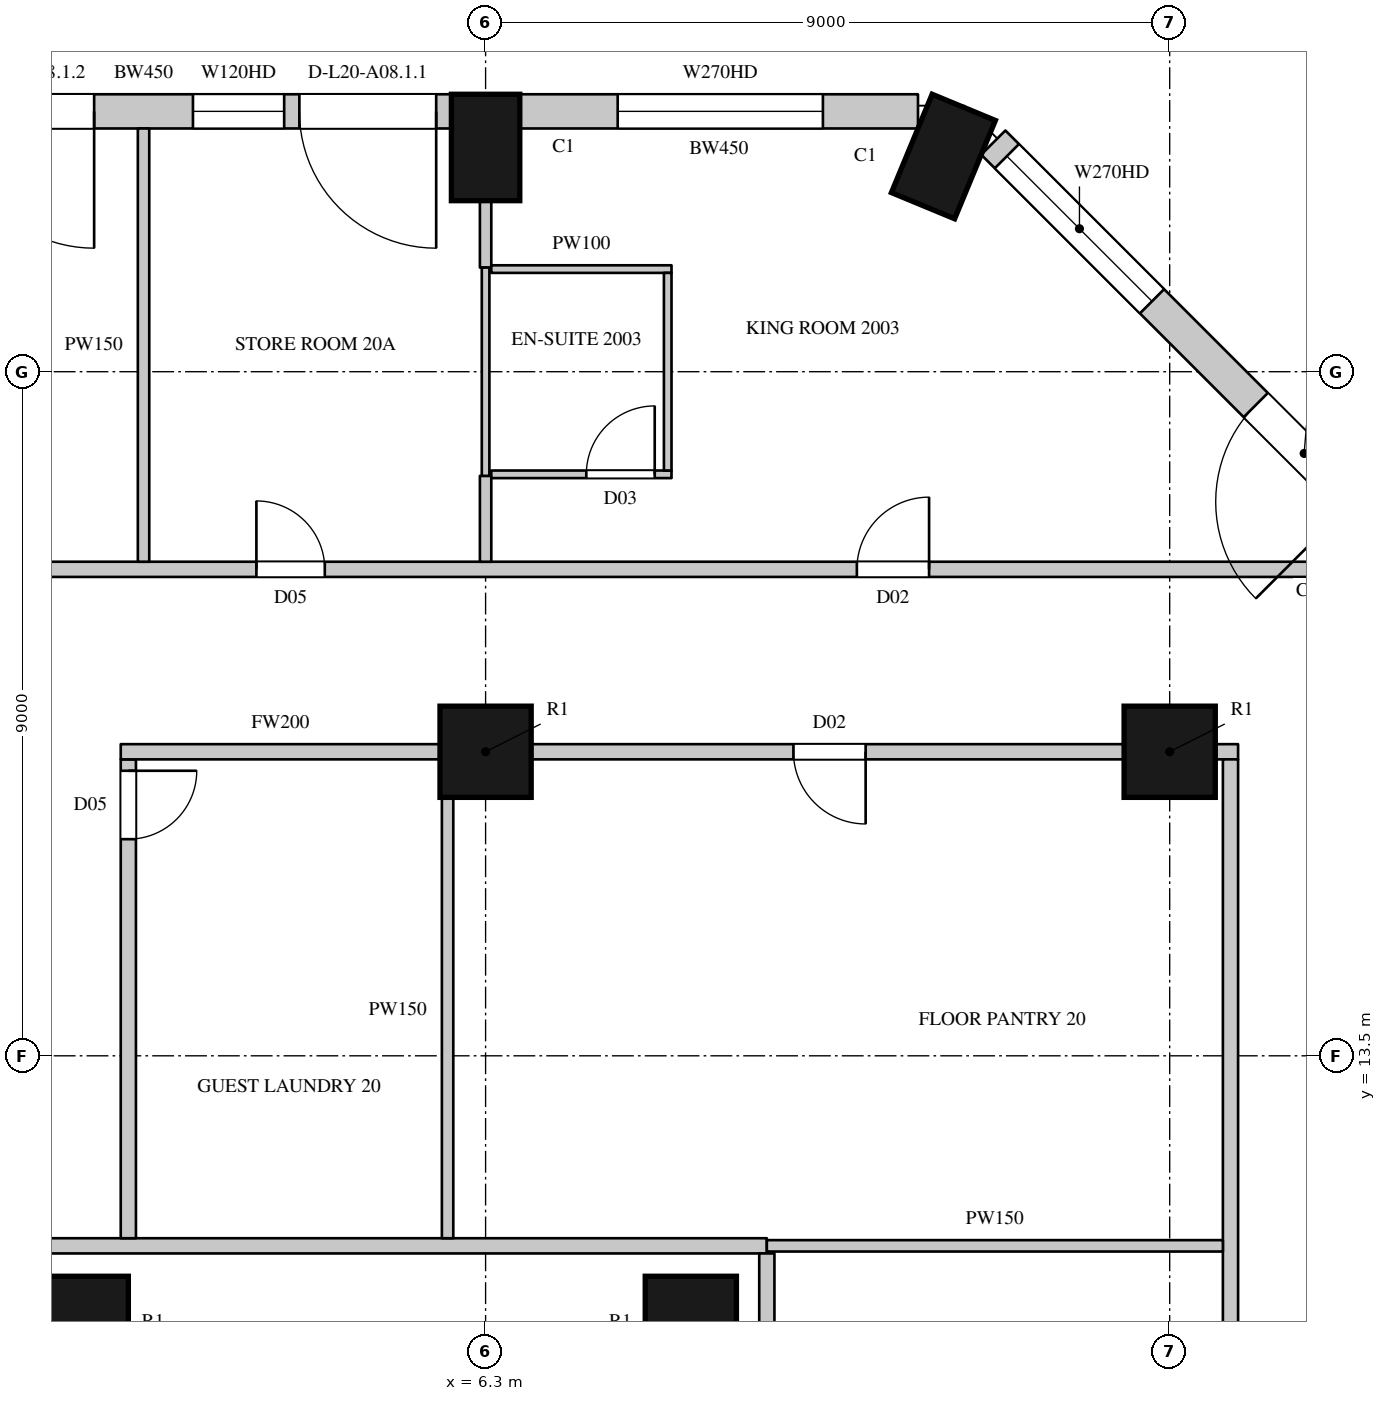
"""IFC4 building model, lengths in metres.
Left out: names, types, materials, properties, quantities, classifications, styles, units other than length and angle.
Written with IfcOpenShell. Run it as: python <this file> out.ifc"""

import sys

from ifc_helpers import new_model, si_unit, direction, frame, frame_2d, origin, origin_2d, place, context, subcontext, project, spatial, rectangle, circle, extrude, element, fill, save


model = new_model("IFC4")
c1 = context("Model", 3, precision=1e-05, world=origin(), true_north=direction((0.0, 1.0)))
c2 = subcontext(c1, "Body", "Model", "MODEL_VIEW")
j1 = project(units=[si_unit("LENGTHUNIT", "METRE"), si_unit("PLANEANGLEUNIT", "RADIAN")], contexts=[c1])
p1 = place(None, origin())
s1 = spatial("IfcSite", under=j1, at=p1, CompositionType="ELEMENT")
p2 = place(p1, origin())
s2 = spatial("IfcBuilding", under=s1, at=p2, CompositionType="ELEMENT")
p3 = place(p2, frame((0.0, 0.0, 102.3)))
s3 = spatial("IfcBuildingStorey", under=s2, at=p3, CompositionType="ELEMENT", Elevation=102.3)
for number, where, z_axis, x_axis in (
    (1, (12.323, 25.331, 0.0), (0.0, 0.0, 1.0), (-0.924, 0.383, 0.0)),
    (2, (6.3, 25.45, 0.0), (0.0, 0.0, 1.0), (-1.0, 0.0, 0.0)),
):
    element("IfcColumn", number, at=place(p3, frame(where, z_axis=z_axis, x_axis=x_axis)), inside=s3, PredefinedType="COLUMN", context=c2, shape_type="SweptSolid", body=[
        extrude(rectangle(XDim=0.9, YDim=1.4, at=origin_2d()), origin(), (0.0, 0.0, 1.0), 3.6),
    ])
for number, where, z_axis, x_axis in (
    (3, (6.3, 17.5, 0.0), (0.0, 0.0, 1.0), (1.0, 0.0, 0.0)),
    (4, (15.3, 17.5, 0.0), (0.0, 0.0, 1.0), (1.0, 0.0, 0.0)),
    (5, (1.0, 10.0, 0.0), (0.0, 0.0, 1.0), (1.0, 0.0, 0.0)),
    (6, (9.0, 10.0, 0.0), (0.0, 0.0, 1.0), (1.0, 0.0, 0.0)),
):
    element("IfcColumn", number, at=place(p3, frame(where, z_axis=z_axis, x_axis=x_axis)), inside=s3, PredefinedType="COLUMN", context=c2, shape_type="SweptSolid", body=[
        extrude(circle(Radius=0.6, at=origin_2d()), origin(), (0.0, 0.0, 1.0), 3.6),
    ])
p4 = place(p3, frame((18.229, 20.265, 0.0), z_axis=(0.0, 0.0, 1.0), x_axis=(-0.707106781187, 0.707106781187, 0.0)))
e7 = element("IfcWall", 7, at=p4, inside=s3, PredefinedType="SOLIDWALL", context=c2, shape_type="SweptSolid", body=[
    extrude(rectangle(XDim=7.424, YDim=0.45, at=frame_2d((3.712, 0.0))), origin(), (0.0, 0.0, 1.0), 3.3),
])
p5 = place(p4, frame((0.74, 0.0, 0.0)))
e8 = element("IfcOpeningElement", 8, at=p5, cuts=e7, PredefinedType="OPENING", context=c2, shape_type="SweptSolid", body=[
    extrude(rectangle(XDim=1.8, YDim=2.4, at=frame_2d((0.9, 1.2))), frame((0.0, 0.235, 0.0), z_axis=(0.0, -1.0, 0.0), x_axis=(1.0, 0.0, 0.0)), (0.0, 0.0, 1.0), 0.47),
])
p6 = place(p4, frame((4.471, 0.0, 1.05)))
e9 = element("IfcOpeningElement", 9, at=p6, cuts=e7, PredefinedType="OPENING", context=c2, shape_type="SweptSolid", body=[
    extrude(rectangle(XDim=2.7, YDim=2.0, at=frame_2d((1.35, 1.0))), frame((0.0, 0.235, 0.0), z_axis=(0.0, -1.0, 0.0), x_axis=(1.0, 0.0, 0.0)), (0.0, 0.0, 1.0), 0.47),
])
p7 = place(p3, frame((11.989, 25.925, 0.0), z_axis=(0.0, 0.0, 1.0), x_axis=(-1.0, 0.0, 0.0)))
e10 = element("IfcWall", 10, at=p7, inside=s3, PredefinedType="SOLIDWALL", context=c2, shape_type="SweptSolid", body=[
    extrude(rectangle(XDim=5.239, YDim=0.45, at=frame_2d((2.619, 0.0))), origin(), (0.0, 0.0, 1.0), 3.3),
])
p8 = place(p7, frame((1.251, 0.0, 1.05)))
e11 = element("IfcOpeningElement", 11, at=p8, cuts=e10, PredefinedType="OPENING", context=c2, shape_type="SweptSolid", body=[
    extrude(rectangle(XDim=2.7, YDim=2.0, at=frame_2d((1.35, 1.0))), frame((0.0, 0.235, 0.0), z_axis=(0.0, -1.0, 0.0), x_axis=(1.0, 0.0, 0.0)), (0.0, 0.0, 1.0), 0.47),
])
p9 = place(p3, frame((5.85, 25.925, 0.0), z_axis=(0.0, 0.0, 1.0), x_axis=(-1.0, 0.0, 0.0)))
e12 = element("IfcWall", 12, at=p9, inside=s3, PredefinedType="SOLIDWALL", context=c2, shape_type="SweptSolid", body=[
    extrude(rectangle(XDim=8.1, YDim=0.45, at=frame_2d((4.05, 0.0))), origin(), (0.0, 0.0, 1.0), 3.3),
])
p10 = place(p9, frame((0.2, 0.0, 0.0)))
e13 = element("IfcOpeningElement", 13, at=p10, cuts=e12, PredefinedType="OPENING", context=c2, shape_type="SweptSolid", body=[
    extrude(rectangle(XDim=1.8, YDim=2.4, at=frame_2d((0.9, 1.2))), frame((0.0, 0.235, 0.0), z_axis=(0.0, -1.0, 0.0), x_axis=(1.0, 0.0, 0.0)), (0.0, 0.0, 1.0), 0.47),
])
p11 = place(p9, frame((2.2, 0.0, 1.05)))
e14 = element("IfcOpeningElement", 14, at=p11, cuts=e12, PredefinedType="OPENING", context=c2, shape_type="SweptSolid", body=[
    extrude(rectangle(XDim=1.2, YDim=2.0, at=frame_2d((0.6, 1.0))), frame((0.0, 0.235, 0.0), z_axis=(0.0, -1.0, 0.0), x_axis=(1.0, 0.0, 0.0)), (0.0, 0.0, 1.0), 0.47),
])
p12 = place(p9, frame((4.7, 0.0, 0.0)))
e15 = element("IfcOpeningElement", 15, at=p12, cuts=e12, PredefinedType="OPENING", context=c2, shape_type="SweptSolid", body=[
    extrude(rectangle(XDim=1.8, YDim=2.4, at=frame_2d((0.9, 1.2))), frame((0.0, 0.235, 0.0), z_axis=(0.0, -1.0, 0.0), x_axis=(1.0, 0.0, 0.0)), (0.0, 0.0, 1.0), 0.47),
])
p13 = place(p9, frame((6.7, 0.0, 1.05)))
e16 = element("IfcOpeningElement", 16, at=p13, cuts=e12, PredefinedType="OPENING", context=c2, shape_type="SweptSolid", body=[
    extrude(rectangle(XDim=1.2, YDim=2.0, at=frame_2d((0.6, 1.0))), frame((0.0, 0.235, 0.0), z_axis=(0.0, -1.0, 0.0), x_axis=(1.0, 0.0, 0.0)), (0.0, 0.0, 1.0), 0.47),
])
p14 = place(p3, frame((16.486, 23.529, 0.0), z_axis=(0.0, 0.0, 1.0), x_axis=(-0.707022305137, 0.707191247145, 0.0)))
e17 = element("IfcWall", 17, at=p14, inside=s3, PredefinedType="SOLIDWALL", context=c2, shape_type="SweptSolid", body=[
    extrude(rectangle(XDim=1.445, YDim=0.45, at=frame_2d((0.723, 0.0))), origin(), (0.0, 0.0, 1.0), 0.6),
])
p15 = place(p3, frame((-23.765, 19.9, 0.0), z_axis=(0.0, 0.0, 1.0), x_axis=(1.0, 0.0, 0.0)))
e18 = element("IfcWall", 18, at=p15, inside=s3, PredefinedType="PARTITIONING", context=c2, shape_type="SweptSolid", body=[
    extrude(rectangle(XDim=41.549, YDim=0.2, at=frame_2d((20.774, 0.0))), origin(), (0.0, 0.0, 1.0), 3.3),
])
p16 = place(p15, frame((14.2, 0.0, 0.0)))
e19 = element("IfcOpeningElement", 19, at=p16, cuts=e18, PredefinedType="OPENING", context=c2, shape_type="SweptSolid", body=[
    extrude(rectangle(XDim=0.9, YDim=2.2, at=frame_2d((0.45, 1.1))), frame((0.0, 0.11, 0.0), z_axis=(0.0, -1.0, 0.0), x_axis=(1.0, 0.0, 0.0)), (0.0, 0.0, 1.0), 0.22),
])
p17 = place(p15, frame((27.05, 0.0, 0.0)))
e20 = element("IfcOpeningElement", 20, at=p17, cuts=e18, PredefinedType="OPENING", context=c2, shape_type="SweptSolid", body=[
    extrude(rectangle(XDim=0.9, YDim=2.2, at=frame_2d((0.45, 1.1))), frame((0.0, 0.11, 0.0), z_axis=(0.0, -1.0, 0.0), x_axis=(1.0, 0.0, 0.0)), (0.0, 0.0, 1.0), 0.22),
])
p18 = place(p15, frame((0.75, 0.0, 0.0)))
e21 = element("IfcOpeningElement", 21, at=p18, cuts=e18, PredefinedType="OPENING", context=c2, shape_type="SweptSolid", body=[
    extrude(rectangle(XDim=1.1, YDim=2.4, at=frame_2d((0.55, 1.2))), frame((0.0, 0.11, 0.0), z_axis=(0.0, -1.0, 0.0), x_axis=(1.0, 0.0, 0.0)), (0.0, 0.0, 1.0), 0.22),
])
p19 = place(p15, frame((23.15, 0.0, 0.0)))
e22 = element("IfcOpeningElement", 22, at=p19, cuts=e18, PredefinedType="OPENING", context=c2, shape_type="SweptSolid", body=[
    extrude(rectangle(XDim=0.95, YDim=2.2, at=frame_2d((0.475, 1.1))), frame((0.0, 0.11, 0.0), z_axis=(0.0, -1.0, 0.0), x_axis=(1.0, 0.0, 0.0)), (0.0, 0.0, 1.0), 0.22),
])
p20 = place(p15, frame((34.95, 0.0, 0.0)))
e23 = element("IfcOpeningElement", 23, at=p20, cuts=e18, PredefinedType="OPENING", context=c2, shape_type="SweptSolid", body=[
    extrude(rectangle(XDim=0.95, YDim=2.2, at=frame_2d((0.475, 1.1))), frame((0.0, 0.11, 0.0), z_axis=(0.0, -1.0, 0.0), x_axis=(1.0, 0.0, 0.0)), (0.0, 0.0, 1.0), 0.22),
])
p21 = place(p3, frame((-7.9, 11.0, 0.0), z_axis=(0.0, 0.0, 1.0), x_axis=(1.0, 0.0, 0.0)))
e24 = element("IfcWall", 24, at=p21, inside=s3, PredefinedType="PARTITIONING", context=c2, shape_type="SweptSolid", body=[
    extrude(rectangle(XDim=17.9, YDim=0.2, at=frame_2d((8.95, 0.0))), origin(), (0.0, 0.0, 1.0), 3.3),
])
p22 = place(p21, frame((6.5, 0.0, 0.0)))
e25 = element("IfcOpeningElement", 25, at=p22, cuts=e24, PredefinedType="OPENING", context=c2, shape_type="SweptSolid", body=[
    extrude(rectangle(XDim=1.5, YDim=2.2, at=frame_2d((0.75, 1.1))), frame((0.0, 0.11, 0.0), z_axis=(0.0, -1.0, 0.0), x_axis=(1.0, 0.0, 0.0)), (0.0, 0.0, 1.0), 0.22),
])
p23 = place(p3, frame((1.6, 11.1, 0.0), z_axis=(0.0, 0.0, 1.0), x_axis=(0.0, 1.0, 0.0)))
e26 = element("IfcWall", 26, at=p23, inside=s3, PredefinedType="PARTITIONING", context=c2, shape_type="SweptSolid", body=[
    extrude(rectangle(XDim=6.3, YDim=0.2, at=frame_2d((3.15, 0.0))), origin(), (0.0, 0.0, 1.0), 3.3),
])
p24 = place(p23, frame((5.25, 0.0, 0.0)))
e27 = element("IfcOpeningElement", 27, at=p24, cuts=e26, PredefinedType="OPENING", context=c2, shape_type="SweptSolid", body=[
    extrude(rectangle(XDim=0.9, YDim=2.2, at=frame_2d((0.45, 1.1))), frame((0.0, 0.11, 0.0), z_axis=(0.0, -1.0, 0.0), x_axis=(1.0, 0.0, 0.0)), (0.0, 0.0, 1.0), 0.22),
])
p25 = place(p3, frame((1.5, 17.5, 0.0), z_axis=(0.0, 0.0, 1.0), x_axis=(1.0, 0.0, 0.0)))
e28 = element("IfcWall", 28, at=p25, inside=s3, PredefinedType="PARTITIONING", context=c2, shape_type="SweptSolid", body=[
    extrude(rectangle(XDim=4.2, YDim=0.2, at=frame_2d((2.1, 0.0))), origin(), (0.0, 0.0, 1.0), 2.75),
])
p26 = place(p3, frame((6.9, 17.5, 0.0), z_axis=(0.0, 0.0, 1.0), x_axis=(1.0, 0.0, 0.0)))
e29 = element("IfcWall", 29, at=p26, inside=s3, PredefinedType="PARTITIONING", context=c2, shape_type="SweptSolid", body=[
    extrude(rectangle(XDim=7.8, YDim=0.2, at=frame_2d((3.9, 0.0))), origin(), (0.0, 0.0, 1.0), 2.75),
])
p27 = place(p26, frame((3.45, 0.0, 0.0)))
e30 = element("IfcOpeningElement", 30, at=p27, cuts=e29, PredefinedType="OPENING", context=c2, shape_type="SweptSolid", body=[
    extrude(rectangle(XDim=0.95, YDim=2.2, at=frame_2d((0.475, 1.1))), frame((0.0, 0.11, 0.0), z_axis=(0.0, -1.0, 0.0), x_axis=(1.0, 0.0, 0.0)), (0.0, 0.0, 1.0), 0.22),
])
p28 = place(p3, frame((15.9, 17.5, 0.0), z_axis=(0.0, 0.0, 1.0), x_axis=(1.0, 0.0, 0.0)))
e31 = element("IfcWall", 31, at=p28, inside=s3, PredefinedType="PARTITIONING", context=c2, shape_type="SweptSolid", body=[
    extrude(rectangle(XDim=0.3, YDim=0.2, at=frame_2d((0.15, 0.0))), origin(), (0.0, 0.0, 1.0), 3.3),
])
p29 = place(p3, frame((10.0, -10.9, 0.0), z_axis=(0.0, 0.0, 1.0), x_axis=(0.0, 1.0, 0.0)))
e32 = element("IfcWall", 32, at=p29, inside=s3, PredefinedType="PARTITIONING", context=c2, shape_type="SweptSolid", body=[
    extrude(rectangle(XDim=21.8, YDim=0.2, at=frame_2d((10.9, 0.0))), origin(), (0.0, 0.0, 1.0), 3.3),
])
p30 = place(p29, frame((15.9, 0.0, 0.0)))
e33 = element("IfcOpeningElement", 33, at=p30, cuts=e32, PredefinedType="OPENING", context=c2, shape_type="SweptSolid", body=[
    extrude(rectangle(XDim=1.5, YDim=2.2, at=frame_2d((0.75, 1.1))), frame((0.0, 0.11, 0.0), z_axis=(0.0, -1.0, 0.0), x_axis=(1.0, 0.0, 0.0)), (0.0, 0.0, 1.0), 0.22),
])
p31 = place(p29, frame((11.55, 0.0, 0.0)))
e34 = element("IfcOpeningElement", 34, at=p31, cuts=e32, PredefinedType="OPENING", context=c2, shape_type="SweptSolid", body=[
    extrude(rectangle(XDim=1.5, YDim=2.2, at=frame_2d((0.75, 1.1))), frame((0.0, 0.11, 0.0), z_axis=(0.0, -1.0, 0.0), x_axis=(1.0, 0.0, 0.0)), (0.0, 0.0, 1.0), 0.22),
])
p32 = place(p3, frame((16.1, 6.825, 0.0), z_axis=(0.0, 0.0, 1.0), x_axis=(0.0, 1.0, 0.0)))
e35 = element("IfcWall", 35, at=p32, inside=s3, PredefinedType="PARTITIONING", context=c2, shape_type="SweptSolid", body=[
    extrude(rectangle(XDim=10.575, YDim=0.2, at=frame_2d((5.288, 0.0))), origin(), (0.0, 0.0, 1.0), 3.3),
])
p33 = place(p3, frame((1.8, 20.0, 0.0), z_axis=(0.0, 0.0, 1.0), x_axis=(0.0, 1.0, 0.0)))
e36 = element("IfcWall", 36, at=p33, inside=s3, PredefinedType="PARTITIONING", context=c2, shape_type="SweptSolid", body=[
    extrude(rectangle(XDim=5.7, YDim=0.15, at=frame_2d((2.85, 0.0))), origin(), (0.0, 0.0, 1.0), 2.65),
])
p34 = place(p3, frame((5.8, 11.1, 0.0), z_axis=(0.0, 0.0, 1.0), x_axis=(0.0, 1.0, 0.0)))
e37 = element("IfcWall", 37, at=p34, inside=s3, PredefinedType="PARTITIONING", context=c2, shape_type="SweptSolid", body=[
    extrude(rectangle(XDim=5.989, YDim=0.15, at=frame_2d((2.994, 0.0))), origin(), (0.0, 0.0, 1.0), 3.3),
])
p35 = place(p3, frame((6.3, 20.0, 0.0), z_axis=(0.0, 0.0, 1.0), x_axis=(0.0, 1.0, 0.0)))
e38 = element("IfcWall", 38, at=p35, inside=s3, PredefinedType="PARTITIONING", context=c2, shape_type="SweptSolid", body=[
    extrude(rectangle(XDim=1.13, YDim=0.15, at=frame_2d((0.565, 0.0))), origin(), (0.0, 0.0, 1.0), 2.75),
])
p36 = place(p3, frame((6.3, 23.87, 0.0), z_axis=(0.0, 0.0, 1.0), x_axis=(0.0, 1.0, 0.0)))
e39 = element("IfcWall", 39, at=p36, inside=s3, PredefinedType="PARTITIONING", context=c2, shape_type="SweptSolid", body=[
    extrude(rectangle(XDim=0.88, YDim=0.15, at=frame_2d((0.44, 0.0))), origin(), (0.0, 0.0, 1.0), 2.75),
])
p37 = place(p3, frame((10.0, 11.0, 0.0), z_axis=(0.0, 0.0, 1.0), x_axis=(1.0, 0.0, 0.0)))
e40 = element("IfcWall", 40, at=p37, inside=s3, PredefinedType="PARTITIONING", context=c2, shape_type="SweptSolid", body=[
    extrude(rectangle(XDim=6.0, YDim=0.15, at=frame_2d((3.0, 0.0))), origin(), (0.0, 0.0, 1.0), 3.3),
])
p38 = place(p3, frame((6.3, 21.13, 0.0), z_axis=(0.0, 0.0, 1.0), x_axis=(0.0, 1.0, 0.0)))
e41 = element("IfcWall", 41, at=p38, inside=s3, PredefinedType="PARTITIONING", context=c2, shape_type="SweptSolid", body=[
    extrude(rectangle(XDim=2.74, YDim=0.1, at=frame_2d((1.37, 0.0))), origin(), (0.0, 0.0, 1.0), 2.75),
])
p39 = place(p3, frame((6.375, 21.15, 0.0), z_axis=(0.0, 0.0, 1.0), x_axis=(1.0, 0.0, 0.0)))
e42 = element("IfcWall", 42, at=p39, inside=s3, PredefinedType="PARTITIONING", context=c2, shape_type="SweptSolid", body=[
    extrude(rectangle(XDim=2.371, YDim=0.1, at=frame_2d((1.186, 0.0))), origin(), (0.0, 0.0, 1.0), 3.3),
])
p40 = place(p39, frame((1.25, 0.0, 0.0)))
e43 = element("IfcOpeningElement", 43, at=p40, cuts=e42, PredefinedType="OPENING", context=c2, shape_type="SweptSolid", body=[
    extrude(rectangle(XDim=0.9, YDim=2.2, at=frame_2d((0.45, 1.1))), frame((0.0, 0.06, 0.0), z_axis=(0.0, -1.0, 0.0), x_axis=(1.0, 0.0, 0.0)), (0.0, 0.0, 1.0), 0.12),
])
p41 = place(p3, frame((6.375, 23.85, 0.0), z_axis=(0.0, 0.0, 1.0), x_axis=(1.0, 0.0, 0.0)))
e44 = element("IfcWall", 44, at=p41, inside=s3, PredefinedType="PARTITIONING", context=c2, shape_type="SweptSolid", body=[
    extrude(rectangle(XDim=2.371, YDim=0.1, at=frame_2d((1.186, 0.0))), origin(), (0.0, 0.0, 1.0), 3.3),
])
p42 = place(p3, frame((8.696, 21.2, 0.0), z_axis=(0.0, 0.0, 1.0), x_axis=(0.0, 1.0, 0.0)))
e45 = element("IfcWall", 45, at=p42, inside=s3, PredefinedType="PARTITIONING", context=c2, shape_type="SweptSolid", body=[
    extrude(rectangle(XDim=2.6, YDim=0.1, at=frame_2d((1.3, 0.0))), origin(), (0.0, 0.0, 1.0), 3.3),
])
p43 = place(p5, origin())
e46 = element("IfcDoor", 46, at=p43, inside=s3, OperationType="SLIDING_TO_LEFT", PredefinedType="DOOR", context=c2, shape_type="SweptSolid", body=[
    extrude(rectangle(XDim=1.8, YDim=2.4, at=frame_2d((0.9, 1.2))), frame((0.0, 0.13, 0.0), z_axis=(0.0, -1.0, 0.0), x_axis=(1.0, 0.0, 0.0)), (0.0, 0.0, 1.0), 0.05),
])
fill(e8, e46)
p44 = place(p6, origin())
e47 = element("IfcWindow", 47, at=p44, inside=s3, PartitioningType="SINGLE_PANEL", PredefinedType="WINDOW", context=c2, shape_type="SweptSolid", body=[
    extrude(rectangle(XDim=2.7, YDim=2.0, at=frame_2d((1.35, 1.0))), frame((0.0, 0.135, 0.0), z_axis=(0.0, -1.0, 0.0), x_axis=(1.0, 0.0, 0.0)), (0.0, 0.0, 1.0), 0.06),
])
fill(e9, e47)
p45 = place(p8, origin())
e48 = element("IfcWindow", 48, at=p45, inside=s3, PartitioningType="SINGLE_PANEL", PredefinedType="WINDOW", context=c2, shape_type="SweptSolid", body=[
    extrude(rectangle(XDim=2.7, YDim=2.0, at=frame_2d((1.35, 1.0))), frame((0.0, 0.135, 0.0), z_axis=(0.0, -1.0, 0.0), x_axis=(1.0, 0.0, 0.0)), (0.0, 0.0, 1.0), 0.06),
])
fill(e11, e48)
p46 = place(p10, origin())
e49 = element("IfcDoor", 49, at=p46, inside=s3, OperationType="SLIDING_TO_LEFT", PredefinedType="DOOR", context=c2, shape_type="SweptSolid", body=[
    extrude(rectangle(XDim=1.8, YDim=2.4, at=frame_2d((0.9, 1.2))), frame((0.0, 0.13, 0.0), z_axis=(0.0, -1.0, 0.0), x_axis=(1.0, 0.0, 0.0)), (0.0, 0.0, 1.0), 0.05),
])
fill(e13, e49)
p47 = place(p11, origin())
e50 = element("IfcWindow", 50, at=p47, inside=s3, PartitioningType="SINGLE_PANEL", PredefinedType="WINDOW", context=c2, shape_type="SweptSolid", body=[
    extrude(rectangle(XDim=1.2, YDim=2.0, at=frame_2d((0.6, 1.0))), frame((0.0, 0.135, 0.0), z_axis=(0.0, -1.0, 0.0), x_axis=(1.0, 0.0, 0.0)), (0.0, 0.0, 1.0), 0.06),
])
fill(e14, e50)
p48 = place(p12, origin())
e51 = element("IfcDoor", 51, at=p48, inside=s3, OperationType="SLIDING_TO_LEFT", PredefinedType="DOOR", context=c2, shape_type="SweptSolid", body=[
    extrude(rectangle(XDim=1.8, YDim=2.4, at=frame_2d((0.9, 1.2))), frame((0.0, 0.13, 0.0), z_axis=(0.0, -1.0, 0.0), x_axis=(1.0, 0.0, 0.0)), (0.0, 0.0, 1.0), 0.05),
])
fill(e15, e51)
p49 = place(p24, origin())
e52 = element("IfcDoor", 52, at=p49, inside=s3, OperationType="SINGLE_SWING_LEFT", PredefinedType="DOOR", context=c2, shape_type="SweptSolid", body=[
    extrude(rectangle(XDim=0.9, YDim=2.2, at=frame_2d((0.45, 1.1))), frame((0.0, 0.025, 0.0), z_axis=(0.0, -1.0, 0.0), x_axis=(1.0, 0.0, 0.0)), (0.0, 0.0, 1.0), 0.05),
])
fill(e27, e52)
p50 = place(p27, origin())
e53 = element("IfcDoor", 53, at=p50, inside=s3, OperationType="SINGLE_SWING_LEFT", PredefinedType="DOOR", context=c2, shape_type="SweptSolid", body=[
    extrude(rectangle(XDim=0.95, YDim=2.2, at=frame_2d((0.475, 1.1))), frame((0.0, 0.025, 0.0), z_axis=(0.0, -1.0, 0.0), x_axis=(1.0, 0.0, 0.0)), (0.0, 0.0, 1.0), 0.05),
])
fill(e30, e53)
p51 = place(p17, origin())
e54 = element("IfcDoor", 54, at=p51, inside=s3, OperationType="SINGLE_SWING_LEFT", PredefinedType="DOOR", context=c2, shape_type="SweptSolid", body=[
    extrude(rectangle(XDim=0.9, YDim=2.2, at=frame_2d((0.45, 1.1))), frame((0.0, 0.025, 0.0), z_axis=(0.0, -1.0, 0.0), x_axis=(1.0, 0.0, 0.0)), (0.0, 0.0, 1.0), 0.05),
])
fill(e20, e54)
p52 = place(p20, origin())
e55 = element("IfcDoor", 55, at=p52, inside=s3, OperationType="SINGLE_SWING_RIGHT", PredefinedType="DOOR", context=c2, shape_type="SweptSolid", body=[
    extrude(rectangle(XDim=0.95, YDim=2.2, at=frame_2d((0.475, 1.1))), frame((0.0, 0.025, 0.0), z_axis=(0.0, -1.0, 0.0), x_axis=(1.0, 0.0, 0.0)), (0.0, 0.0, 1.0), 0.05),
])
fill(e23, e55)
p53 = place(p40, origin())
e56 = element("IfcDoor", 56, at=p53, inside=s3, OperationType="SINGLE_SWING_RIGHT", PredefinedType="DOOR", context=c2, shape_type="SweptSolid", body=[
    extrude(rectangle(XDim=0.9, YDim=2.2, at=frame_2d((0.45, 1.1))), frame((0.0, 0.025, 0.0), z_axis=(0.0, -1.0, 0.0), x_axis=(1.0, 0.0, 0.0)), (0.0, 0.0, 1.0), 0.05),
])
fill(e43, e56)
save(model, sys.argv[1])
